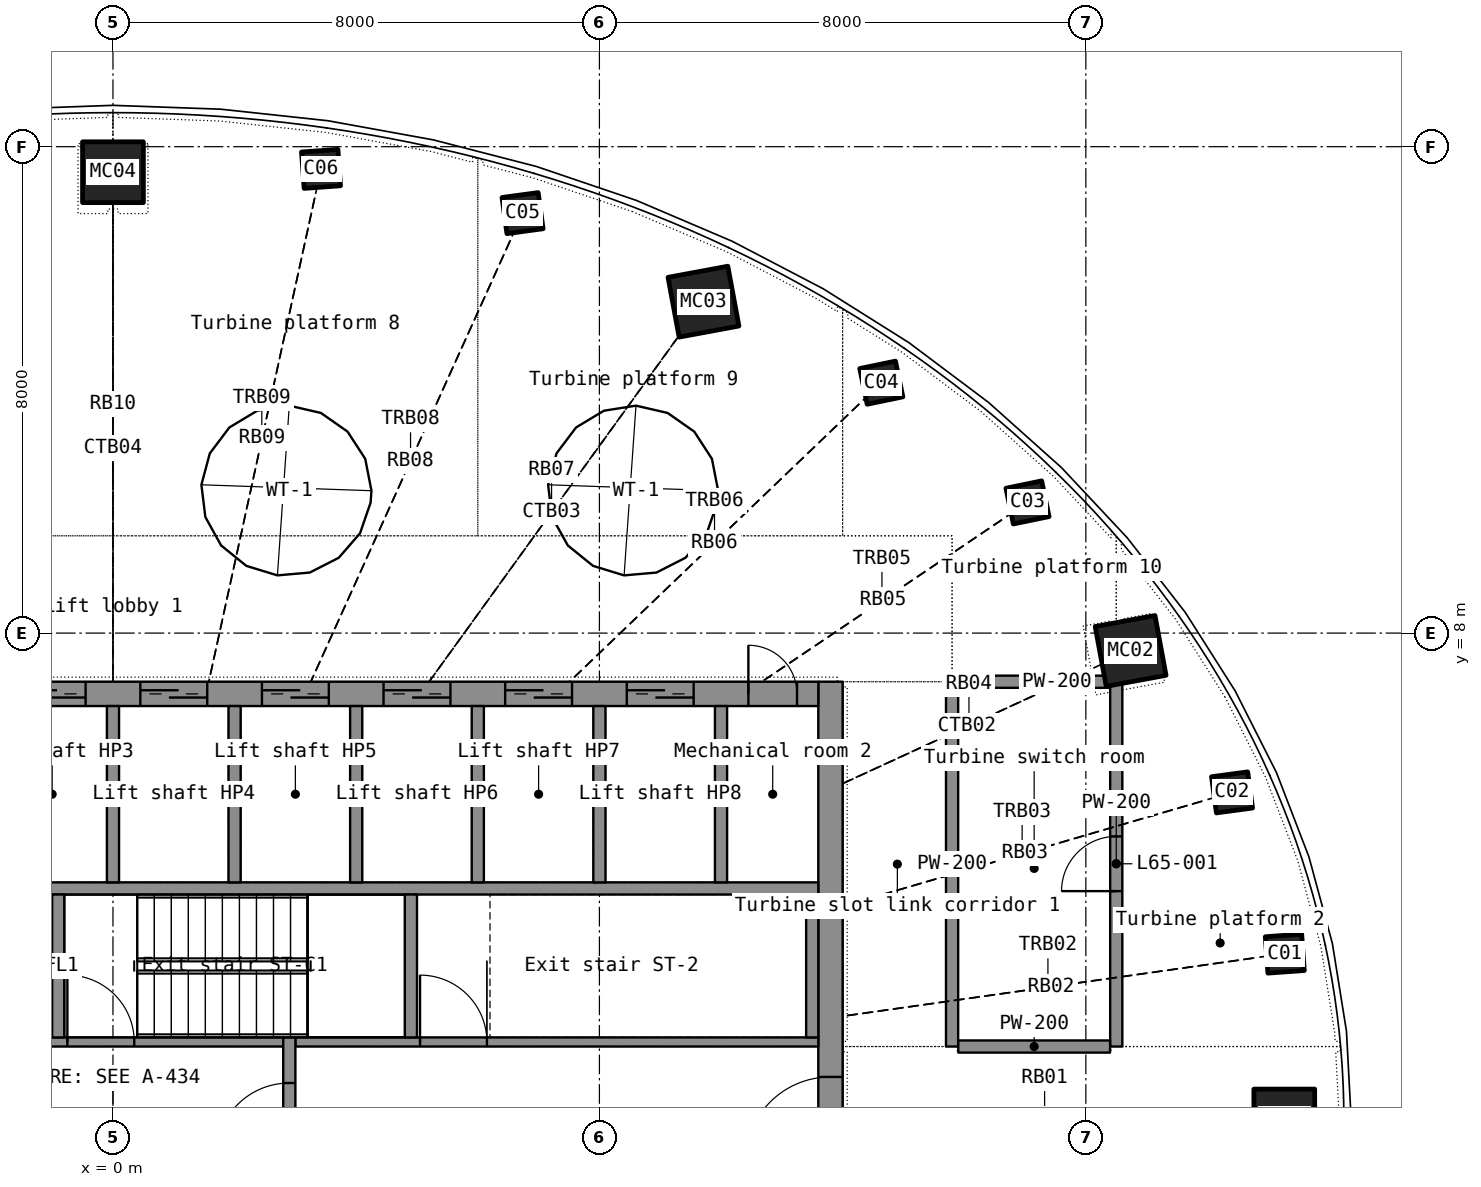
"""IFC4 building model, lengths in metres.
Left out: names, types, materials, properties, quantities, classifications, styles, units other than length and angle.
Written with IfcOpenShell. Run it as: python <this file> out.ifc"""

import sys

from ifc_helpers import new_model, si_unit, direction, frame, frame_2d, origin, origin_2d, place, context, subcontext, project, spatial, rectangle, hollow_rectangle, extrude, element, fill, save


model = new_model("IFC4")
c1 = context("Model", 3, precision=1e-05, world=origin(), true_north=direction((0.0, 1.0)))
c2 = subcontext(c1, "Body", "Model", "MODEL_VIEW")
j1 = project(units=[si_unit("LENGTHUNIT", "METRE"), si_unit("PLANEANGLEUNIT", "RADIAN")], contexts=[c1])
p1 = place(None, origin())
s1 = spatial("IfcSite", under=j1, at=p1, CompositionType="ELEMENT")
p2 = place(p1, origin())
s2 = spatial("IfcBuilding", under=s1, at=p2, CompositionType="ELEMENT")
p3 = place(p2, frame((0.0, 0.0, 265.2)))
s3 = spatial("IfcBuildingStorey", under=s2, at=p3, CompositionType="ELEMENT", Elevation=265.2)
p4 = place(p3, frame((19.263, 0.0, 0.0), z_axis=(-0.034587192, 0.0, 0.999401684), x_axis=(0.0, -1.0, 0.0)))
e1 = element("IfcColumn", 1, at=p4, inside=s3, PredefinedType="COLUMN", context=c2, shape_type="SweptSolid", body=[
    extrude(hollow_rectangle(XDim=1.0, YDim=1.0, WallThickness=0.032, at=origin_2d()), origin(), (0.0, 0.0, 1.0), 7.405),
])
p5 = place(p3, frame((19.272, 2.728, 0.0), z_axis=(-0.034059852, -0.004912796, 0.99940772), x_axis=(0.21296706, -0.977056295, 0.002455003)))
e2 = element("IfcColumn", 2, at=p5, inside=s3, PredefinedType="COLUMN", context=c2, shape_type="SweptSolid", body=[
    extrude(hollow_rectangle(XDim=0.6, YDim=0.6, WallThickness=0.025, at=origin_2d()), origin(), (0.0, 0.0, 1.0), 7.405),
])
p6 = place(p3, frame((18.404, 5.38, 0.0), z_axis=(-0.032477793, -0.009660907, 0.999425765), x_axis=(0.410307078, -0.911936229, 0.004518332)))
e3 = element("IfcColumn", 3, at=p6, inside=s3, PredefinedType="COLUMN", context=c2, shape_type="SweptSolid", body=[
    extrude(hollow_rectangle(XDim=0.6, YDim=0.6, WallThickness=0.025, at=origin_2d()), origin(), (0.0, 0.0, 1.0), 7.404),
])
p7 = place(p3, frame((16.736, 7.706, 0.0), z_axis=(-0.02993968, -0.014178483, 0.999451142), x_axis=(0.58479336, -0.811160032, 0.006010807)))
e4 = element("IfcColumn", 4, at=p7, inside=s3, PredefinedType="COLUMN", context=c2, shape_type="SweptSolid", body=[
    extrude(hollow_rectangle(XDim=1.0, YDim=1.0, WallThickness=0.032, at=origin_2d()), origin(), (0.0, 0.0, 1.0), 7.404),
])
p8 = place(p3, frame((15.041, 10.149, 0.0), z_axis=(-0.026511305, -0.018201791, 0.999482789), x_axis=(0.721084308, -0.692816746, 0.006509747)))
e5 = element("IfcColumn", 5, at=p8, inside=s3, PredefinedType="COLUMN", context=c2, shape_type="SweptSolid", body=[
    extrude(hollow_rectangle(XDim=0.6, YDim=0.6, WallThickness=0.025, at=origin_2d()), origin(), (0.0, 0.0, 1.0), 7.404),
])
p9 = place(p3, frame((12.636, 12.118, 0.0), z_axis=(-0.022225407, -0.021730776, 0.999516786), x_axis=(0.829477504, -0.558504573, 0.006301782)))
e6 = element("IfcColumn", 6, at=p9, inside=s3, PredefinedType="COLUMN", context=c2, shape_type="SweptSolid", body=[
    extrude(hollow_rectangle(XDim=0.6, YDim=0.6, WallThickness=0.025, at=origin_2d()), origin(), (0.0, 0.0, 1.0), 7.404),
])
p10 = place(p3, frame((9.711, 13.451, 0.0), z_axis=(-0.017279668, -0.02453449, 0.999549635), x_axis=(0.908911912, -0.416952184, 0.005478454)))
e7 = element("IfcColumn", 7, at=p10, inside=s3, PredefinedType="COLUMN", context=c2, shape_type="SweptSolid", body=[
    extrude(hollow_rectangle(XDim=1.0, YDim=1.0, WallThickness=0.032, at=origin_2d()), origin(), (0.0, 0.0, 1.0), 7.404),
])
p11 = place(p3, frame((6.736, 14.907, 0.0), z_axis=(-0.011805877, -0.026645666, 0.999575225), x_axis=(0.960364691, -0.278719123, 0.003912953)))
e8 = element("IfcColumn", 8, at=p11, inside=s3, PredefinedType="COLUMN", context=c2, shape_type="SweptSolid", body=[
    extrude(hollow_rectangle(XDim=0.6, YDim=0.6, WallThickness=0.025, at=origin_2d()), origin(), (0.0, 0.0, 1.0), 7.403),
])
p12 = place(p3, frame((3.422, 15.635, 0.0), z_axis=(-0.006001975, -0.027899292, 0.99959272), x_axis=(0.990225435, -0.139461007, 0.002053282)))
e9 = element("IfcColumn", 9, at=p12, inside=s3, PredefinedType="COLUMN", context=c2, shape_type="SweptSolid", body=[
    extrude(hollow_rectangle(XDim=0.6, YDim=0.6, WallThickness=0.025, at=origin_2d()), origin(), (0.0, 0.0, 1.0), 7.403),
])
p13 = place(p3, frame((0.0, 15.58, 0.0), z_axis=(0.0, -0.028361125, 0.999597742), x_axis=(1.0, 0.0, 0.0)))
e10 = element("IfcColumn", 10, at=p13, inside=s3, PredefinedType="COLUMN", context=c2, shape_type="SweptSolid", body=[
    extrude(hollow_rectangle(XDim=1.0, YDim=1.0, WallThickness=0.032, at=origin_2d()), origin(), (0.0, 0.0, 1.0), 7.403),
])
p14 = place(p3, frame((11.8, -7.2, 0.0), z_axis=(0.0, 0.0, 1.0), x_axis=(0.0, 1.0, 0.0)))
e11 = element("IfcWall", 11, at=p14, inside=s3, PredefinedType="SHEAR", context=c2, shape_type="SweptSolid", body=[
    extrude(rectangle(XDim=14.4, YDim=0.4, at=frame_2d((7.2, 0.0))), origin(), (0.0, 0.0, 1.0), 6.9),
])
p15 = place(p14, frame((6.5, 0.0, 0.0)))
e12 = element("IfcOpeningElement", 12, at=p15, cuts=e11, PredefinedType="OPENING", context=c2, shape_type="SweptSolid", body=[
    extrude(rectangle(XDim=1.4, YDim=2.2, at=frame_2d((0.7, 1.1))), frame((0.0, 0.21, 0.0), z_axis=(0.0, -1.0, 0.0), x_axis=(1.0, 0.0, 0.0)), (0.0, 0.0, 1.0), 0.42),
])
p16 = place(p3, frame((-11.6, 7.0, 0.0), z_axis=(0.0, 0.0, 1.0), x_axis=(1.0, 0.0, 0.0)))
e13 = element("IfcWall", 13, at=p16, inside=s3, PredefinedType="SHEAR", context=c2, shape_type="SweptSolid", body=[
    extrude(rectangle(XDim=23.2, YDim=0.4, at=frame_2d((11.6, 0.0))), origin(), (0.0, 0.0, 1.0), 6.9),
])
p17 = place(p16, frame((2.05, 0.0, 0.0)))
e14 = element("IfcOpeningElement", 14, at=p17, cuts=e13, PredefinedType="OPENING", context=c2, shape_type="SweptSolid", body=[
    extrude(rectangle(XDim=1.1, YDim=2.2, at=frame_2d((0.55, 1.1))), frame((0.0, 0.21, 0.0), z_axis=(0.0, -1.0, 0.0), x_axis=(1.0, 0.0, 0.0)), (0.0, 0.0, 1.0), 0.42),
])
p18 = place(p16, frame((6.05, 0.0, 0.0)))
e15 = element("IfcOpeningElement", 15, at=p18, cuts=e13, PredefinedType="OPENING", context=c2, shape_type="SweptSolid", body=[
    extrude(rectangle(XDim=1.1, YDim=2.2, at=frame_2d((0.55, 1.1))), frame((0.0, 0.21, 0.0), z_axis=(0.0, -1.0, 0.0), x_axis=(1.0, 0.0, 0.0)), (0.0, 0.0, 1.0), 0.42),
])
p19 = place(p16, frame((8.05, 0.0, 0.0)))
e16 = element("IfcOpeningElement", 16, at=p19, cuts=e13, PredefinedType="OPENING", context=c2, shape_type="SweptSolid", body=[
    extrude(rectangle(XDim=1.1, YDim=2.2, at=frame_2d((0.55, 1.1))), frame((0.0, 0.21, 0.0), z_axis=(0.0, -1.0, 0.0), x_axis=(1.0, 0.0, 0.0)), (0.0, 0.0, 1.0), 0.42),
])
p20 = place(p16, frame((10.05, 0.0, 0.0)))
e17 = element("IfcOpeningElement", 17, at=p20, cuts=e13, PredefinedType="OPENING", context=c2, shape_type="SweptSolid", body=[
    extrude(rectangle(XDim=1.1, YDim=2.2, at=frame_2d((0.55, 1.1))), frame((0.0, 0.21, 0.0), z_axis=(0.0, -1.0, 0.0), x_axis=(1.0, 0.0, 0.0)), (0.0, 0.0, 1.0), 0.42),
])
p21 = place(p16, frame((12.05, 0.0, 0.0)))
e18 = element("IfcOpeningElement", 18, at=p21, cuts=e13, PredefinedType="OPENING", context=c2, shape_type="SweptSolid", body=[
    extrude(rectangle(XDim=1.1, YDim=2.2, at=frame_2d((0.55, 1.1))), frame((0.0, 0.21, 0.0), z_axis=(0.0, -1.0, 0.0), x_axis=(1.0, 0.0, 0.0)), (0.0, 0.0, 1.0), 0.42),
])
p22 = place(p16, frame((14.05, 0.0, 0.0)))
e19 = element("IfcOpeningElement", 19, at=p22, cuts=e13, PredefinedType="OPENING", context=c2, shape_type="SweptSolid", body=[
    extrude(rectangle(XDim=1.1, YDim=2.2, at=frame_2d((0.55, 1.1))), frame((0.0, 0.21, 0.0), z_axis=(0.0, -1.0, 0.0), x_axis=(1.0, 0.0, 0.0)), (0.0, 0.0, 1.0), 0.42),
])
p23 = place(p16, frame((16.05, 0.0, 0.0)))
e20 = element("IfcOpeningElement", 20, at=p23, cuts=e13, PredefinedType="OPENING", context=c2, shape_type="SweptSolid", body=[
    extrude(rectangle(XDim=1.1, YDim=2.2, at=frame_2d((0.55, 1.1))), frame((0.0, 0.21, 0.0), z_axis=(0.0, -1.0, 0.0), x_axis=(1.0, 0.0, 0.0)), (0.0, 0.0, 1.0), 0.42),
])
p24 = place(p16, frame((18.05, 0.0, 0.0)))
e21 = element("IfcOpeningElement", 21, at=p24, cuts=e13, PredefinedType="OPENING", context=c2, shape_type="SweptSolid", body=[
    extrude(rectangle(XDim=1.1, YDim=2.2, at=frame_2d((0.55, 1.1))), frame((0.0, 0.21, 0.0), z_axis=(0.0, -1.0, 0.0), x_axis=(1.0, 0.0, 0.0)), (0.0, 0.0, 1.0), 0.42),
])
p25 = place(p16, frame((20.05, 0.0, 0.0)))
e22 = element("IfcOpeningElement", 22, at=p25, cuts=e13, PredefinedType="OPENING", context=c2, shape_type="SweptSolid", body=[
    extrude(rectangle(XDim=1.1, YDim=2.2, at=frame_2d((0.55, 1.1))), frame((0.0, 0.21, 0.0), z_axis=(0.0, -1.0, 0.0), x_axis=(1.0, 0.0, 0.0)), (0.0, 0.0, 1.0), 0.42),
])
p26 = place(p16, frame((4.15, 0.0, 0.0)))
e23 = element("IfcOpeningElement", 23, at=p26, cuts=e13, PredefinedType="OPENING", context=c2, shape_type="SweptSolid", body=[
    extrude(rectangle(XDim=0.9, YDim=2.1, at=frame_2d((0.45, 1.05))), frame((0.0, 0.21, 0.0), z_axis=(0.0, -1.0, 0.0), x_axis=(1.0, 0.0, 0.0)), (0.0, 0.0, 1.0), 0.42),
])
p27 = place(p16, frame((0.35, 0.0, 0.0)))
e24 = element("IfcOpeningElement", 24, at=p27, cuts=e13, PredefinedType="OPENING", context=c2, shape_type="SweptSolid", body=[
    extrude(rectangle(XDim=0.8, YDim=2.05, at=frame_2d((0.4, 1.025))), frame((0.0, 0.21, 0.0), z_axis=(0.0, -1.0, 0.0), x_axis=(1.0, 0.0, 0.0)), (0.0, 0.0, 1.0), 0.42),
])
p28 = place(p16, frame((22.05, 0.0, 0.0)))
e25 = element("IfcOpeningElement", 25, at=p28, cuts=e13, PredefinedType="OPENING", context=c2, shape_type="SweptSolid", body=[
    extrude(rectangle(XDim=0.8, YDim=2.05, at=frame_2d((0.4, 1.025))), frame((0.0, 0.21, 0.0), z_axis=(0.0, -1.0, 0.0), x_axis=(1.0, 0.0, 0.0)), (0.0, 0.0, 1.0), 0.42),
])
p29 = place(p3, frame((-11.6, 3.8, 0.0), z_axis=(0.0, 0.0, 1.0), x_axis=(1.0, 0.0, 0.0)))
e26 = element("IfcWall", 26, at=p29, inside=s3, PredefinedType="SHEAR", context=c2, shape_type="SweptSolid", body=[
    extrude(rectangle(XDim=23.2, YDim=0.2, at=frame_2d((11.6, 0.0))), origin(), (0.0, 0.0, 1.0), 6.9),
])
for number, where, z_axis, x_axis in (
    (27, (0.0, 3.9, 0.0), (0.0, 0.0, 1.0), (0.0, 1.0, 0.0)),
    (28, (2.0, 3.9, 0.0), (0.0, 0.0, 1.0), (0.0, 1.0, 0.0)),
    (29, (4.0, 3.9, 0.0), (0.0, 0.0, 1.0), (0.0, 1.0, 0.0)),
    (30, (6.0, 3.9, 0.0), (0.0, 0.0, 1.0), (0.0, 1.0, 0.0)),
    (31, (8.0, 3.9, 0.0), (0.0, 0.0, 1.0), (0.0, 1.0, 0.0)),
    (32, (10.0, 3.9, 0.0), (0.0, 0.0, 1.0), (0.0, 1.0, 0.0)),
):
    element("IfcWall", number, at=place(p3, frame(where, z_axis=z_axis, x_axis=x_axis)), inside=s3, PredefinedType="SHEAR", context=c2, shape_type="SweptSolid", body=[
        extrude(rectangle(XDim=2.9, YDim=0.2, at=frame_2d((1.45, 0.0))), origin(), (0.0, 0.0, 1.0), 6.9),
    ])
p30 = place(p3, frame((-2.8, 1.275, 0.0), z_axis=(0.0, 0.0, 1.0), x_axis=(1.0, 0.0, 0.0)))
e33 = element("IfcWall", 33, at=p30, inside=s3, PredefinedType="SHEAR", context=c2, shape_type="SweptSolid", body=[
    extrude(rectangle(XDim=5.6, YDim=0.15, at=frame_2d((2.8, 0.0))), origin(), (0.0, 0.0, 1.0), 6.9),
])
p31 = place(p30, frame((0.35, 0.0, 0.0)))
e34 = element("IfcOpeningElement", 34, at=p31, cuts=e33, PredefinedType="OPENING", context=c2, shape_type="SweptSolid", body=[
    extrude(rectangle(XDim=1.1, YDim=2.2, at=frame_2d((0.55, 1.1))), frame((0.0, 0.085, 0.0), z_axis=(0.0, -1.0, 0.0), x_axis=(1.0, 0.0, 0.0)), (0.0, 0.0, 1.0), 0.17),
])
p32 = place(p30, frame((2.05, 0.0, 0.0)))
e35 = element("IfcOpeningElement", 35, at=p32, cuts=e33, PredefinedType="OPENING", context=c2, shape_type="SweptSolid", body=[
    extrude(rectangle(XDim=1.1, YDim=2.15, at=frame_2d((0.55, 1.075))), frame((0.0, 0.085, 0.0), z_axis=(0.0, -1.0, 0.0), x_axis=(1.0, 0.0, 0.0)), (0.0, 0.0, 1.0), 0.17),
])
p33 = place(p3, frame((3.0, 1.275, 0.0), z_axis=(0.0, 0.0, 1.0), x_axis=(1.0, 0.0, 0.0)))
e36 = element("IfcWall", 36, at=p33, inside=s3, PredefinedType="SHEAR", context=c2, shape_type="SweptSolid", body=[
    extrude(rectangle(XDim=8.6, YDim=0.15, at=frame_2d((4.3, 0.0))), origin(), (0.0, 0.0, 1.0), 6.9),
])
p34 = place(p33, frame((2.05, 0.0, 0.0)))
e37 = element("IfcOpeningElement", 37, at=p34, cuts=e36, PredefinedType="OPENING", context=c2, shape_type="SweptSolid", body=[
    extrude(rectangle(XDim=1.1, YDim=2.15, at=frame_2d((0.55, 1.075))), frame((0.0, 0.085, 0.0), z_axis=(0.0, -1.0, 0.0), x_axis=(1.0, 0.0, 0.0)), (0.0, 0.0, 1.0), 0.17),
])
p35 = place(p3, frame((2.9, -3.7, 0.0), z_axis=(0.0, 0.0, 1.0), x_axis=(0.0, 1.0, 0.0)))
e38 = element("IfcWall", 38, at=p35, inside=s3, PredefinedType="SHEAR", context=c2, shape_type="SweptSolid", body=[
    extrude(rectangle(XDim=5.05, YDim=0.2, at=frame_2d((2.525, 0.0))), origin(), (0.0, 0.0, 1.0), 6.9),
])
p36 = place(p35, frame((3.1, 0.0, 0.0)))
e39 = element("IfcOpeningElement", 39, at=p36, cuts=e38, PredefinedType="OPENING", context=c2, shape_type="SweptSolid", body=[
    extrude(rectangle(XDim=1.2, YDim=2.2, at=frame_2d((0.6, 1.1))), frame((0.0, 0.11, 0.0), z_axis=(0.0, -1.0, 0.0), x_axis=(1.0, 0.0, 0.0)), (0.0, 0.0, 1.0), 0.22),
])
for number, where, z_axis, x_axis in (
    (40, (-0.9, 1.35, 0.0), (0.0, 0.0, 1.0), (0.0, 1.0, 0.0)),
    (41, (11.5, 1.35, 0.0), (0.0, 0.0, 1.0), (0.0, 1.0, 0.0)),
    (42, (4.9, 1.35, 0.0), (0.0, 0.0, 1.0), (0.0, 1.0, 0.0)),
):
    element("IfcWall", number, at=place(p3, frame(where, z_axis=z_axis, x_axis=x_axis)), inside=s3, PredefinedType="SHEAR", context=c2, shape_type="SweptSolid", body=[
        extrude(rectangle(XDim=2.35, YDim=0.2, at=frame_2d((1.175, 0.0))), origin(), (0.0, 0.0, 1.0), 6.9),
    ])
p37 = place(p3, frame((16.5, 1.2, 0.0), z_axis=(0.0, 0.0, 1.0), x_axis=(0.0, 1.0, 0.0)))
e43 = element("IfcWall", 43, at=p37, inside=s3, PredefinedType="PARTITIONING", context=c2, shape_type="SweptSolid", body=[
    extrude(rectangle(XDim=6.012, YDim=0.2, at=frame_2d((3.006, 0.0))), origin(), (0.0, 0.0, 1.0), 6.1),
])
p38 = place(p37, frame((2.556, 0.0, 0.0)))
e44 = element("IfcOpeningElement", 44, at=p38, cuts=e43, PredefinedType="OPENING", context=c2, shape_type="SweptSolid", body=[
    extrude(rectangle(XDim=0.9, YDim=2.1, at=frame_2d((0.45, 1.05))), frame((0.0, 0.11, 0.0), z_axis=(0.0, -1.0, 0.0), x_axis=(1.0, 0.0, 0.0)), (0.0, 0.0, 1.0), 0.22),
])
p39 = place(p3, frame((13.8, 1.2, 0.0), z_axis=(0.0, 0.0, 1.0), x_axis=(0.0, 1.0, 0.0)))
e45 = element("IfcWall", 45, at=p39, inside=s3, PredefinedType="PARTITIONING", context=c2, shape_type="SweptSolid", body=[
    extrude(rectangle(XDim=6.0, YDim=0.2, at=frame_2d((3.0, 0.0))), origin(), (0.0, 0.0, 1.0), 6.1),
])
for number, where, z_axis, x_axis in (
    (46, (16.398, 1.2, 0.0), (0.0, 0.0, 1.0), (-1.0, 0.0, 0.0)),
    (47, (16.398, 7.2, 0.0), (0.0, 0.0, 1.0), (-1.0, 0.0, 0.0)),
):
    element("IfcWall", number, at=place(p3, frame(where, z_axis=z_axis, x_axis=x_axis)), inside=s3, PredefinedType="PARTITIONING", context=c2, shape_type="SweptSolid", body=[
        extrude(rectangle(XDim=2.496, YDim=0.2, at=frame_2d((1.248, 0.0))), origin(), (0.0, 0.0, 1.0), 6.1),
    ])
p40 = place(p20, origin())
e48 = element("IfcDoor", 48, at=p40, inside=s3, OperationType="DOUBLE_DOOR_SLIDING", PredefinedType="DOOR", context=c2, shape_type="SweptSolid", body=[
    extrude(rectangle(XDim=1.1, YDim=2.2, at=frame_2d((0.55, 1.1))), frame((0.0, 0.025, 0.0), z_axis=(0.0, -1.0, 0.0), x_axis=(1.0, 0.0, 0.0)), (0.0, 0.0, 1.0), 0.05),
])
fill(e17, e48)
p41 = place(p21, origin())
e49 = element("IfcDoor", 49, at=p41, inside=s3, OperationType="DOUBLE_DOOR_SLIDING", PredefinedType="DOOR", context=c2, shape_type="SweptSolid", body=[
    extrude(rectangle(XDim=1.1, YDim=2.2, at=frame_2d((0.55, 1.1))), frame((0.0, 0.025, 0.0), z_axis=(0.0, -1.0, 0.0), x_axis=(1.0, 0.0, 0.0)), (0.0, 0.0, 1.0), 0.05),
])
fill(e18, e49)
p42 = place(p22, origin())
e50 = element("IfcDoor", 50, at=p42, inside=s3, OperationType="DOUBLE_DOOR_SLIDING", PredefinedType="DOOR", context=c2, shape_type="SweptSolid", body=[
    extrude(rectangle(XDim=1.1, YDim=2.2, at=frame_2d((0.55, 1.1))), frame((0.0, 0.025, 0.0), z_axis=(0.0, -1.0, 0.0), x_axis=(1.0, 0.0, 0.0)), (0.0, 0.0, 1.0), 0.05),
])
fill(e19, e50)
p43 = place(p23, origin())
e51 = element("IfcDoor", 51, at=p43, inside=s3, OperationType="DOUBLE_DOOR_SLIDING", PredefinedType="DOOR", context=c2, shape_type="SweptSolid", body=[
    extrude(rectangle(XDim=1.1, YDim=2.2, at=frame_2d((0.55, 1.1))), frame((0.0, 0.025, 0.0), z_axis=(0.0, -1.0, 0.0), x_axis=(1.0, 0.0, 0.0)), (0.0, 0.0, 1.0), 0.05),
])
fill(e20, e51)
p44 = place(p24, origin())
e52 = element("IfcDoor", 52, at=p44, inside=s3, OperationType="DOUBLE_DOOR_SLIDING", PredefinedType="DOOR", context=c2, shape_type="SweptSolid", body=[
    extrude(rectangle(XDim=1.1, YDim=2.2, at=frame_2d((0.55, 1.1))), frame((0.0, 0.025, 0.0), z_axis=(0.0, -1.0, 0.0), x_axis=(1.0, 0.0, 0.0)), (0.0, 0.0, 1.0), 0.05),
])
fill(e21, e52)
p45 = place(p25, origin())
e53 = element("IfcDoor", 53, at=p45, inside=s3, OperationType="DOUBLE_DOOR_SLIDING", PredefinedType="DOOR", context=c2, shape_type="SweptSolid", body=[
    extrude(rectangle(XDim=1.1, YDim=2.2, at=frame_2d((0.55, 1.1))), frame((0.0, 0.025, 0.0), z_axis=(0.0, -1.0, 0.0), x_axis=(1.0, 0.0, 0.0)), (0.0, 0.0, 1.0), 0.05),
])
fill(e22, e53)
p46 = place(p28, origin())
e54 = element("IfcDoor", 54, at=p46, inside=s3, OperationType="SINGLE_SWING_LEFT", PredefinedType="DOOR", context=c2, shape_type="SweptSolid", body=[
    extrude(rectangle(XDim=0.8, YDim=2.05, at=frame_2d((0.4, 1.025))), frame((0.0, 0.025, 0.0), z_axis=(0.0, -1.0, 0.0), x_axis=(1.0, 0.0, 0.0)), (0.0, 0.0, 1.0), 0.05),
])
fill(e25, e54)
p47 = place(p15, origin())
e55 = element("IfcDoor", 55, at=p47, inside=s3, OperationType="DOUBLE_DOOR_SINGLE_SWING", PredefinedType="DOOR", context=c2, shape_type="SweptSolid", body=[
    extrude(rectangle(XDim=1.4, YDim=2.2, at=frame_2d((0.7, 1.1))), frame((0.0, 0.025, 0.0), z_axis=(0.0, -1.0, 0.0), x_axis=(1.0, 0.0, 0.0)), (0.0, 0.0, 1.0), 0.05),
])
fill(e12, e55)
p48 = place(p36, origin())
e56 = element("IfcDoor", 56, at=p48, inside=s3, OperationType="SINGLE_SWING_LEFT", PredefinedType="DOOR", context=c2, shape_type="SweptSolid", body=[
    extrude(rectangle(XDim=1.2, YDim=2.2, at=frame_2d((0.6, 1.1))), frame((0.0, 0.025, 0.0), z_axis=(0.0, -1.0, 0.0), x_axis=(1.0, 0.0, 0.0)), (0.0, 0.0, 1.0), 0.05),
])
fill(e39, e56)
p49 = place(p34, origin())
e57 = element("IfcDoor", 57, at=p49, inside=s3, OperationType="SINGLE_SWING_LEFT", PredefinedType="DOOR", context=c2, shape_type="SweptSolid", body=[
    extrude(rectangle(XDim=1.1, YDim=2.15, at=frame_2d((0.55, 1.075))), frame((0.0, 0.025, 0.0), z_axis=(0.0, -1.0, 0.0), x_axis=(1.0, 0.0, 0.0)), (0.0, 0.0, 1.0), 0.05),
])
fill(e37, e57)
p50 = place(p32, origin())
e58 = element("IfcDoor", 58, at=p50, inside=s3, OperationType="SINGLE_SWING_LEFT", PredefinedType="DOOR", context=c2, shape_type="SweptSolid", body=[
    extrude(rectangle(XDim=1.1, YDim=2.15, at=frame_2d((0.55, 1.075))), frame((0.0, 0.025, 0.0), z_axis=(0.0, -1.0, 0.0), x_axis=(1.0, 0.0, 0.0)), (0.0, 0.0, 1.0), 0.05),
])
fill(e35, e58)
p51 = place(p38, origin())
e59 = element("IfcDoor", 59, at=p51, inside=s3, OperationType="SINGLE_SWING_LEFT", PredefinedType="DOOR", context=c2, shape_type="SweptSolid", body=[
    extrude(rectangle(XDim=0.9, YDim=2.1, at=frame_2d((0.45, 1.05))), frame((0.0, 0.025, 0.0), z_axis=(0.0, -1.0, 0.0), x_axis=(1.0, 0.0, 0.0)), (0.0, 0.0, 1.0), 0.05),
])
fill(e44, e59)
save(model, sys.argv[1])
